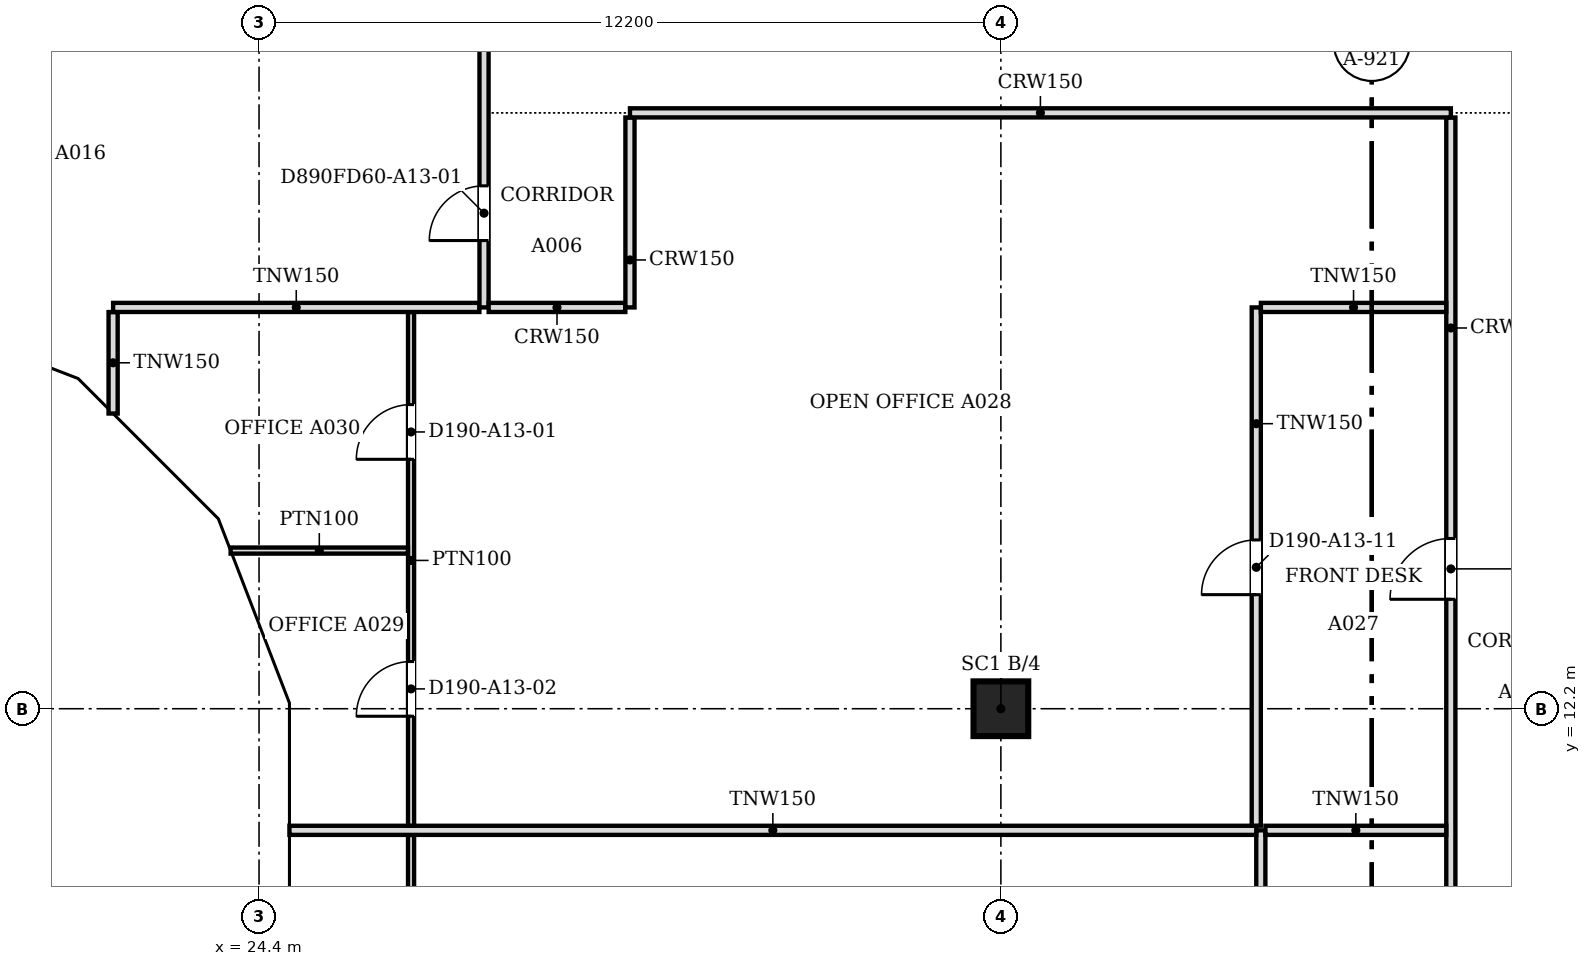
"""IFC4 building model, lengths in metres.
Left out: names, types, materials, properties, quantities, classifications, styles, units other than length and angle.
Written with IfcOpenShell. Run it as: python <this file> out.ifc"""

import sys

from ifc_helpers import new_model, si_unit, direction, frame, frame_2d, origin, origin_2d, place, context, subcontext, project, spatial, polyline, rectangle, outline, extrude, faceted_brep, source, transform, mapped, element, fill, save


model = new_model("IFC4")
c1 = context("Model", 3, precision=1e-05, world=origin(), true_north=direction((0.0, 1.0)))
c2 = subcontext(c1, "Body", "Model", "MODEL_VIEW")
j1 = project(units=[si_unit("LENGTHUNIT", "METRE"), si_unit("PLANEANGLEUNIT", "RADIAN")], contexts=[c1])
p1 = place(None, origin())
s1 = spatial("IfcSite", under=j1, at=p1, CompositionType="ELEMENT")
p2 = place(p1, origin())
s2 = spatial("IfcBuilding", under=s1, at=p2, CompositionType="ELEMENT")
p3 = place(p2, frame((0.0, 0.0, 143.0)))
s3 = spatial("IfcBuildingStorey", under=s2, at=p3, CompositionType="ELEMENT", Elevation=143.0)
p4 = place(p3, frame((36.6, 12.2, 0.0), z_axis=(0.0, 0.0, 1.0), x_axis=(1.0, 0.0, 0.0)))
e1 = element("IfcColumn", 1, at=p4, inside=s3, PredefinedType="COLUMN", context=c2, shape_type="SweptSolid", body=[
    extrude(rectangle(XDim=0.9, YDim=0.9, at=origin_2d()), origin(), (0.0, 0.0, 1.0), 3.6),
])
m1 = source(origin(), c2, "Body", "Brep", [
    faceted_brep([(0.093, -0.25, 0.056), (3.143, -0.25, 3.736), (3.143, -0.25, 3.864), (0.093, -0.25, 7.544), (0.0, 0.25, 7.543), (0.047, 0.25, 7.6), (3.196, 0.25, 3.8), (0.047, 0.25, 0.0), (0.0, 0.25, 0.057), (3.196, -0.0, 3.8), (0.047, 0.0, 0.0), (0.047, 0.0, 7.6)], [[[0, 1, 2, 3]], [[4, 5, 6, 7, 8]], [[7, 6, 9, 1, 0, 10]], [[6, 5, 11, 3, 2, 9]], [[5, 4, 11]], [[8, 7, 10]], [[8, 10, 0, 3, 11, 4]], [[1, 9, 2]]]),
])
p5 = place(p3, frame((18.303, 18.567, -3.8), z_axis=(0.0, 0.0, 1.0), x_axis=(0.932978940178, -0.359930961693, 0.0)))
e2 = element("IfcWall", 2, at=p5, inside=s3, PredefinedType="SOLIDWALL", context=c2, shape_type="MappedRepresentation", body=[
    mapped(m1, transform((0.0, 0.0, 0.0), scale=1.0)),
])
m2 = source(origin(), c2, "Body", "SweptSolid", [
    extrude(outline(polyline([(0.247, 0.633), (2.871, 3.8), (0.247, 6.967), (0.247, 0.633)])), frame((0.0, 0.26, 0.0), z_axis=(0.0, -1.0, 0.0), x_axis=(1.0, 0.0, 0.0)), (0.0, 0.0, 1.0), 0.52),
])
p6 = place(p5, origin())
e3 = element("IfcOpeningElement", 3, at=p6, cuts=e2, PredefinedType="OPENING", context=c2, shape_type="MappedRepresentation", body=[
    mapped(m2, transform((0.0, 0.0, 0.0), scale=1.0)),
])
m3 = source(origin(), c2, "Body", "Brep", [
    faceted_brep([(3.103, -0.25, 7.536), (0.053, -0.25, 3.864), (0.053, -0.25, 3.736), (3.103, -0.25, 0.064), (0.0, 0.25, 3.8), (3.156, 0.25, 7.6), (3.209, 0.25, 7.536), (3.209, 0.25, 0.064), (3.156, 0.25, 0.0), (3.156, -0.0, 0.0), (3.156, -0.0, 7.6), (0.0, 0.0, 3.8)], [[[0, 1, 2, 3]], [[4, 5, 6, 7, 8]], [[8, 7, 9]], [[6, 5, 10]], [[5, 4, 11, 1, 0, 10]], [[4, 8, 9, 3, 2, 11]], [[11, 2, 1]], [[3, 9, 7, 6, 10, 0]]]),
])
p7 = place(p3, frame((21.285, 17.417, -3.8), z_axis=(0.0, 0.0, 1.0), x_axis=(0.707106781187, -0.707106781187, 0.0)))
e4 = element("IfcWall", 4, at=p7, inside=s3, PredefinedType="SOLIDWALL", context=c2, shape_type="MappedRepresentation", body=[
    mapped(m3, transform((0.0, 0.0, 0.0), scale=1.0)),
])
m4 = source(origin(), c2, "Body", "SweptSolid", [
    extrude(outline(polyline([(2.956, 6.968), (0.325, 3.8), (2.956, 0.632), (2.956, 6.968)])), frame((0.0, 0.26, 0.0), z_axis=(0.0, -1.0, 0.0), x_axis=(1.0, 0.0, 0.0)), (0.0, 0.0, 1.0), 0.52),
])
p8 = place(p7, origin())
e5 = element("IfcOpeningElement", 5, at=p8, cuts=e4, PredefinedType="OPENING", context=c2, shape_type="MappedRepresentation", body=[
    mapped(m4, transform((0.0, 0.0, 0.0), scale=1.0)),
])
m5 = source(origin(), c2, "Body", "Brep", [
    faceted_brep([(0.106, -0.25, 0.064), (3.156, -0.25, 3.744), (3.156, -0.25, 3.856), (0.106, -0.25, 7.536), (0.0, 0.25, 7.536), (0.053, 0.25, 7.6), (3.202, 0.25, 3.8), (0.053, 0.25, 0.0), (0.0, 0.25, 0.064), (3.202, -0.0, 3.8), (0.053, 0.0, 0.0), (0.053, 0.0, 7.6)], [[[0, 1, 2, 3]], [[4, 5, 6, 7, 8]], [[7, 6, 9, 1, 0, 10]], [[6, 5, 11, 3, 2, 9]], [[5, 4, 11]], [[8, 7, 10]], [[8, 10, 0, 3, 11, 4]], [[1, 9, 2]]]),
])
p9 = place(p3, frame((23.497, 15.234, -3.8), z_axis=(0.0, 0.0, 1.0), x_axis=(0.359913782069, -0.932985567668, 0.0)))
e6 = element("IfcWall", 6, at=p9, inside=s3, PredefinedType="SOLIDWALL", context=c2, shape_type="MappedRepresentation", body=[
    mapped(m5, transform((0.0, 0.0, 0.0), scale=1.0)),
])
m6 = source(origin(), c2, "Body", "SweptSolid", [
    extrude(outline(polyline([(0.253, 0.633), (2.878, 3.8), (0.253, 6.967), (0.253, 0.633)])), frame((0.0, 0.26, 0.0), z_axis=(0.0, -1.0, 0.0), x_axis=(1.0, 0.0, 0.0)), (0.0, 0.0, 1.0), 0.52),
])
p10 = place(p9, origin())
e7 = element("IfcOpeningElement", 7, at=p10, cuts=e6, PredefinedType="OPENING", context=c2, shape_type="MappedRepresentation", body=[
    mapped(m6, transform((0.0, 0.0, 0.0), scale=1.0)),
])
m7 = source(origin(), c2, "Body", "Brep", [
    faceted_brep([(3.096, -0.25, 0.0), (6.1, -0.25, 3.8), (3.096, -0.25, 7.6), (0.047, -0.25, 3.857), (0.047, -0.25, 3.743), (0.0, 0.25, 3.8), (3.096, 0.25, 7.6), (6.053, 0.25, 3.859), (6.053, 0.25, 3.741), (3.096, 0.25, 0.0), (6.1, -0.0, 3.8), (0.0, 0.0, 3.8)], [[[0, 1, 2, 3, 4]], [[5, 6, 7, 8, 9]], [[9, 8, 10, 1, 0]], [[7, 6, 2, 1, 10]], [[6, 5, 11, 3, 2]], [[5, 9, 0, 4, 11]], [[11, 4, 3]], [[10, 8, 7]]]),
])
p11 = place(p3, frame((24.65, 12.247, -3.8), z_axis=(0.0, 0.0, 1.0), x_axis=(0.0, -1.0, 0.0)))
e8 = element("IfcWall", 8, at=p11, inside=s3, PredefinedType="SOLIDWALL", context=c2, shape_type="MappedRepresentation", body=[
    mapped(m7, transform((0.0, 0.0, 0.0), scale=1.0)),
])
m8 = source(origin(), c2, "Body", "SweptSolid", [
    extrude(outline(polyline([(3.094, 0.399), (5.781, 3.8), (3.094, 7.201), (0.323, 3.8), (3.094, 0.399)])), frame((0.0, 0.26, 0.0), z_axis=(0.0, -1.0, 0.0), x_axis=(1.0, 0.0, 0.0)), (0.0, 0.0, 1.0), 0.52),
])
p12 = place(p11, origin())
e9 = element("IfcOpeningElement", 9, at=p12, cuts=e8, PredefinedType="OPENING", context=c2, shape_type="MappedRepresentation", body=[
    mapped(m8, transform((0.0, 0.0, 0.0), scale=1.0)),
])
p13 = place(p2, frame((0.0, 0.0, 146.8)))
s4 = spatial("IfcBuildingStorey", under=s2, at=p13, CompositionType="ELEMENT", Elevation=146.8)
m9 = source(origin(), c2, "Body", "Brep", [
    faceted_brep([(3.096, -0.25, 7.536), (0.047, -0.25, 3.856), (0.047, -0.25, 3.744), (3.096, -0.25, 0.064), (0.0, 0.25, 3.8), (3.149, 0.25, 7.6), (3.202, 0.25, 7.536), (3.202, 0.25, 0.064), (3.149, 0.25, 0.0), (3.149, -0.0, 0.0), (3.149, -0.0, 7.6), (0.0, 0.0, 3.8)], [[[0, 1, 2, 3]], [[4, 5, 6, 7, 8]], [[8, 7, 9]], [[6, 5, 10]], [[5, 4, 11, 1, 0, 10]], [[4, 8, 9, 3, 2, 11]], [[11, 2, 1]], [[3, 9, 7, 6, 10, 0]]]),
])
p14 = place(p13, frame((18.346, 18.55, -3.8), z_axis=(0.0, 0.0, 1.0), x_axis=(0.932985567668, -0.359913782069, 0.0)))
e10 = element("IfcWall", 10, at=p14, inside=s4, PredefinedType="SOLIDWALL", context=c2, shape_type="MappedRepresentation", body=[
    mapped(m9, transform((0.0, 0.0, 0.0), scale=1.0)),
])
m10 = source(origin(), c2, "Body", "SweptSolid", [
    extrude(outline(polyline([(2.949, 6.967), (0.325, 3.8), (2.949, 0.633), (2.949, 6.967)])), frame((0.0, 0.26, 0.0), z_axis=(0.0, -1.0, 0.0), x_axis=(1.0, 0.0, 0.0)), (0.0, 0.0, 1.0), 0.52),
])
p15 = place(p14, origin())
e11 = element("IfcOpeningElement", 11, at=p15, cuts=e10, PredefinedType="OPENING", context=c2, shape_type="MappedRepresentation", body=[
    mapped(m10, transform((0.0, 0.0, 0.0), scale=1.0)),
])
m11 = source(origin(), c2, "Body", "Brep", [
    faceted_brep([(0.106, -0.25, 0.064), (3.156, -0.25, 3.736), (3.156, -0.25, 3.864), (0.106, -0.25, 7.536), (0.0, 0.25, 7.536), (0.053, 0.25, 7.6), (3.209, 0.25, 3.8), (0.053, 0.25, 0.0), (0.0, 0.25, 0.064), (3.209, -0.0, 3.8), (0.053, 0.0, 0.0), (0.053, 0.0, 7.6)], [[[0, 1, 2, 3]], [[4, 5, 6, 7, 8]], [[7, 6, 9, 1, 0, 10]], [[6, 5, 11, 3, 2, 9]], [[5, 4, 11]], [[8, 7, 10]], [[8, 10, 0, 3, 11, 4]], [[1, 9, 2]]]),
])
p16 = place(p13, frame((21.248, 17.454, -3.8), z_axis=(0.0, 0.0, 1.0), x_axis=(0.707106781187, -0.707106781187, 0.0)))
e12 = element("IfcWall", 12, at=p16, inside=s4, PredefinedType="SOLIDWALL", context=c2, shape_type="MappedRepresentation", body=[
    mapped(m11, transform((0.0, 0.0, 0.0), scale=1.0)),
])
m12 = source(origin(), c2, "Body", "SweptSolid", [
    extrude(outline(polyline([(0.253, 0.632), (2.884, 3.8), (0.253, 6.968), (0.253, 0.632)])), frame((0.0, 0.26, 0.0), z_axis=(0.0, -1.0, 0.0), x_axis=(1.0, 0.0, 0.0)), (0.0, 0.0, 1.0), 0.52),
])
p17 = place(p16, origin())
e13 = element("IfcOpeningElement", 13, at=p17, cuts=e12, PredefinedType="OPENING", context=c2, shape_type="MappedRepresentation", body=[
    mapped(m12, transform((0.0, 0.0, 0.0), scale=1.0)),
])
m13 = source(origin(), c2, "Body", "Brep", [
    faceted_brep([(3.103, -0.25, 7.544), (0.053, -0.25, 3.864), (0.053, -0.25, 3.736), (3.103, -0.25, 0.056), (0.0, 0.25, 3.8), (3.149, 0.25, 7.6), (3.196, 0.25, 7.543), (3.196, 0.25, 0.057), (3.149, 0.25, 0.0), (3.149, -0.0, 0.0), (3.149, -0.0, 7.6), (0.0, 0.0, 3.8)], [[[0, 1, 2, 3]], [[4, 5, 6, 7, 8]], [[8, 7, 9]], [[6, 5, 10]], [[5, 4, 11, 1, 0, 10]], [[4, 8, 9, 3, 2, 11]], [[11, 2, 1]], [[3, 9, 7, 6, 10, 0]]]),
])
p18 = place(p13, frame((23.517, 15.185, -3.8), z_axis=(0.0, 0.0, 1.0), x_axis=(0.359864468756, -0.933004589553, 0.0)))
e14 = element("IfcWall", 14, at=p18, inside=s4, PredefinedType="SOLIDWALL", context=c2, shape_type="MappedRepresentation", body=[
    mapped(m13, transform((0.0, 0.0, 0.0), scale=1.0)),
])
p19 = place(p18, origin())
e15 = element("IfcOpeningElement", 15, at=p19, cuts=e14, PredefinedType="OPENING", context=c2, shape_type="MappedRepresentation", body=[
    mapped(m10, transform((0.0, 0.0, 0.0), scale=1.0)),
])
m14 = source(origin(), c2, "Body", "Brep", [
    faceted_brep([(0.093, -0.25, 0.057), (3.143, -0.25, 3.8), (0.093, -0.25, 7.543), (0.0, 0.25, 7.544), (0.047, 0.25, 7.6), (3.143, 0.25, 3.8), (0.047, 0.25, 0.0), (0.0, 0.25, 0.056), (0.047, 0.0, 0.0), (0.047, 0.0, 7.6)], [[[0, 1, 2]], [[3, 4, 5, 6, 7]], [[6, 5, 1, 0, 8]], [[5, 4, 9, 2, 1]], [[4, 3, 9]], [[7, 6, 8]], [[7, 8, 0, 2, 9, 3]]]),
])
p20 = place(p13, frame((24.65, 12.293, -3.8), z_axis=(0.0, 0.0, 1.0), x_axis=(0.0, -1.0, 0.0)))
e16 = element("IfcWall", 16, at=p20, inside=s4, PredefinedType="SOLIDWALL", context=c2, shape_type="MappedRepresentation", body=[
    mapped(m14, transform((0.0, 0.0, 0.0), scale=1.0)),
])
m15 = source(origin(), c2, "Body", "SweptSolid", [
    extrude(outline(polyline([(0.247, 0.641), (2.821, 3.8), (0.247, 6.959), (0.247, 0.641)])), frame((0.0, 0.26, 0.0), z_axis=(0.0, -1.0, 0.0), x_axis=(1.0, 0.0, 0.0)), (0.0, 0.0, 1.0), 0.52),
])
p21 = place(p20, origin())
e17 = element("IfcOpeningElement", 17, at=p21, cuts=e16, PredefinedType="OPENING", context=c2, shape_type="MappedRepresentation", body=[
    mapped(m15, transform((0.0, 0.0, 0.0), scale=1.0)),
])
p22 = place(p3, frame((44.0, 0.5, 0.0), z_axis=(0.0, 0.0, 1.0), x_axis=(0.0, 1.0, 0.0)))
e18 = element("IfcWall", 18, at=p22, inside=s3, PredefinedType="PARTITIONING", context=c2, shape_type="SweptSolid", body=[
    extrude(rectangle(XDim=21.424, YDim=0.15, at=frame_2d((10.712, 0.0))), origin(), (0.0, 0.0, 1.0), 3.067),
])
m16 = source(origin(), c2, "Body", "SweptSolid", [
    extrude(rectangle(XDim=1.0, YDim=2.1, at=frame_2d((0.5, 1.05))), frame((0.0, 0.085, 0.0), z_axis=(0.0, -1.0, 0.0), x_axis=(1.0, 0.0, 0.0)), (0.0, 0.0, 1.0), 0.17),
])
p23 = place(p22, frame((6.2, 0.0, 0.0)))
e19 = element("IfcOpeningElement", 19, at=p23, cuts=e18, PredefinedType="OPENING", context=c2, shape_type="MappedRepresentation", body=[
    mapped(m16, transform((0.0, 0.0, 0.0), scale=1.0)),
])
p24 = place(p22, frame((13.5, 0.0, 0.0)))
e20 = element("IfcOpeningElement", 20, at=p24, cuts=e18, PredefinedType="OPENING", context=c2, shape_type="MappedRepresentation", body=[
    mapped(m16, transform((0.0, 0.0, 0.0), scale=1.0)),
])
p25 = place(p3, frame((26.9, 4.2, 0.0), z_axis=(0.0, 0.0, 1.0), x_axis=(0.0, 1.0, 0.0)))
e21 = element("IfcWall", 21, at=p25, inside=s3, PredefinedType="PARTITIONING", context=c2, shape_type="SweptSolid", body=[
    extrude(rectangle(XDim=5.924, YDim=0.1, at=frame_2d((2.962, 0.0))), origin(), (0.0, 0.0, 1.0), 3.067),
])
m17 = source(origin(), c2, "Body", "SweptSolid", [
    extrude(rectangle(XDim=0.9, YDim=2.1, at=frame_2d((0.45, 1.05))), frame((0.0, 0.06, 0.0), z_axis=(0.0, -1.0, 0.0), x_axis=(1.0, 0.0, 0.0)), (0.0, 0.0, 1.0), 0.12),
])
p26 = place(p25, frame((2.5, 0.0, 0.0)))
e22 = element("IfcOpeningElement", 22, at=p26, cuts=e21, PredefinedType="OPENING", context=c2, shape_type="MappedRepresentation", body=[
    mapped(m17, transform((0.0, 0.0, 0.0), scale=1.0)),
])
p27 = place(p3, frame((40.875, 4.2, 0.0), z_axis=(0.0, 0.0, 1.0), x_axis=(0.0, 1.0, 0.0)))
e23 = element("IfcWall", 23, at=p27, inside=s3, PredefinedType="PARTITIONING", context=c2, shape_type="SweptSolid", body=[
    extrude(rectangle(XDim=6.0, YDim=0.15, at=frame_2d((3.0, 0.0))), origin(), (0.0, 0.0, 1.0), 3.067),
])
p28 = place(p3, frame((24.9, 10.2, 0.0), z_axis=(0.0, 0.0, 1.0), x_axis=(1.0, 0.0, 0.0)))
e24 = element("IfcWall", 24, at=p28, inside=s3, PredefinedType="PARTITIONING", context=c2, shape_type="SweptSolid", body=[
    extrude(rectangle(XDim=15.9, YDim=0.15, at=frame_2d((7.95, 0.0))), origin(), (0.0, 0.0, 1.0), 3.067),
])
p29 = place(p3, frame((40.951, 10.2, 0.0), z_axis=(0.0, 0.0, 1.0), x_axis=(1.0, 0.0, 0.0)))
e25 = element("IfcWall", 25, at=p29, inside=s3, PredefinedType="PARTITIONING", context=c2, shape_type="SweptSolid", body=[
    extrude(rectangle(XDim=2.973, YDim=0.15, at=frame_2d((1.487, 0.0))), origin(), (0.0, 0.0, 1.0), 3.067),
])
p30 = place(p3, frame((26.9, 10.276, 0.0), z_axis=(0.0, 0.0, 1.0), x_axis=(0.0, 1.0, 0.0)))
e26 = element("IfcWall", 26, at=p30, inside=s3, PredefinedType="PARTITIONING", context=c2, shape_type="SweptSolid", body=[
    extrude(rectangle(XDim=8.448, YDim=0.1, at=frame_2d((4.224, 0.0))), origin(), (0.0, 0.0, 1.0), 3.067),
])
p31 = place(p30, frame((6.026, 0.0, 0.0)))
e27 = element("IfcOpeningElement", 27, at=p31, cuts=e26, PredefinedType="OPENING", context=c2, shape_type="MappedRepresentation", body=[
    mapped(m17, transform((0.0, 0.0, 0.0), scale=1.0)),
])
p32 = place(p30, frame((1.8, 0.0, 0.0)))
e28 = element("IfcOpeningElement", 28, at=p32, cuts=e26, PredefinedType="OPENING", context=c2, shape_type="MappedRepresentation", body=[
    mapped(m17, transform((0.0, 0.0, 0.0), scale=1.0)),
])
p33 = place(p3, frame((40.8, 10.276, 0.0), z_axis=(0.0, 0.0, 1.0), x_axis=(0.0, 1.0, 0.0)))
e29 = element("IfcWall", 29, at=p33, inside=s3, PredefinedType="PARTITIONING", context=c2, shape_type="SweptSolid", body=[
    extrude(rectangle(XDim=8.524, YDim=0.15, at=frame_2d((4.262, 0.0))), origin(), (0.0, 0.0, 1.0), 3.067),
])
m18 = source(origin(), c2, "Body", "SweptSolid", [
    extrude(rectangle(XDim=0.9, YDim=2.1, at=frame_2d((0.45, 1.05))), frame((0.0, 0.085, 0.0), z_axis=(0.0, -1.0, 0.0), x_axis=(1.0, 0.0, 0.0)), (0.0, 0.0, 1.0), 0.17),
])
p34 = place(p33, frame((3.8, 0.0, 0.0)))
e30 = element("IfcOpeningElement", 30, at=p34, cuts=e29, PredefinedType="OPENING", context=c2, shape_type="MappedRepresentation", body=[
    mapped(m18, transform((0.0, 0.0, 0.0), scale=1.0)),
])
p35 = place(p3, frame((23.933, 14.801, 0.0), z_axis=(0.0, 0.0, 1.0), x_axis=(1.0, 0.0, 0.0)))
e31 = element("IfcWall", 31, at=p35, inside=s3, PredefinedType="PARTITIONING", context=c2, shape_type="SweptSolid", body=[
    extrude(rectangle(XDim=2.917, YDim=0.1, at=frame_2d((1.458, 0.0))), origin(), (0.0, 0.0, 1.0), 3.067),
])
p36 = place(p3, frame((22.0, 17.055, 0.0), z_axis=(0.0, 0.0, 1.0), x_axis=(0.0, 1.0, 0.0)))
e32 = element("IfcWall", 32, at=p36, inside=s3, PredefinedType="PARTITIONING", context=c2, shape_type="SweptSolid", body=[
    extrude(rectangle(XDim=1.669, YDim=0.15, at=frame_2d((0.834, 0.0))), origin(), (0.0, 0.0, 1.0), 3.067),
])
p37 = place(p3, frame((22.0, 18.8, 0.0), z_axis=(0.0, 0.0, 1.0), x_axis=(1.0, 0.0, 0.0)))
e33 = element("IfcWall", 33, at=p37, inside=s3, PredefinedType="PARTITIONING", context=c2, shape_type="SweptSolid", body=[
    extrude(rectangle(XDim=6.024, YDim=0.15, at=frame_2d((3.012, 0.0))), origin(), (0.0, 0.0, 1.0), 3.067),
])
p38 = place(p3, frame((28.1, 18.8, 0.0), z_axis=(0.0, 0.0, 1.0), x_axis=(0.0, 1.0, 0.0)))
e34 = element("IfcWall", 34, at=p38, inside=s3, PredefinedType="PARTITIONING", context=c2, shape_type="SweptSolid", body=[
    extrude(rectangle(XDim=26.024, YDim=0.15, at=frame_2d((13.012, 0.0))), origin(), (0.0, 0.0, 1.0), 3.067),
])
p39 = place(p38, frame((1.1, 0.0, 0.0)))
e35 = element("IfcOpeningElement", 35, at=p39, cuts=e34, PredefinedType="OPENING", context=c2, shape_type="MappedRepresentation", body=[
    mapped(m18, transform((0.0, 0.0, 0.0), scale=1.0)),
])
p40 = place(p38, frame((14.201, 0.0, 0.0)))
e36 = element("IfcOpeningElement", 36, at=p40, cuts=e34, PredefinedType="OPENING", context=c2, shape_type="MappedRepresentation", body=[
    mapped(m16, transform((0.0, 0.0, 0.0), scale=1.0)),
])
p41 = place(p38, frame((8.2, 0.0, 0.0)))
e37 = element("IfcOpeningElement", 37, at=p41, cuts=e34, PredefinedType="OPENING", context=c2, shape_type="MappedRepresentation", body=[
    mapped(m18, transform((0.0, 0.0, 0.0), scale=1.0)),
])
p42 = place(p38, frame((21.4, 0.0, 0.0)))
e38 = element("IfcOpeningElement", 38, at=p42, cuts=e34, PredefinedType="OPENING", context=c2, shape_type="MappedRepresentation", body=[
    mapped(m16, transform((0.0, 0.0, 0.0), scale=1.0)),
])
p43 = place(p3, frame((28.176, 18.8, 0.0), z_axis=(0.0, 0.0, 1.0), x_axis=(1.0, 0.0, 0.0)))
e39 = element("IfcWall", 39, at=p43, inside=s3, PredefinedType="PARTITIONING", context=c2, shape_type="SweptSolid", body=[
    extrude(rectangle(XDim=2.248, YDim=0.15, at=frame_2d((1.124, 0.0))), origin(), (0.0, 0.0, 1.0), 3.067),
])
p44 = place(p3, frame((30.5, 18.8, 0.0), z_axis=(0.0, 0.0, 1.0), x_axis=(0.0, 1.0, 0.0)))
e40 = element("IfcWall", 40, at=p44, inside=s3, PredefinedType="PARTITIONING", context=c2, shape_type="SweptSolid", body=[
    extrude(rectangle(XDim=3.124, YDim=0.15, at=frame_2d((1.562, 0.0))), origin(), (0.0, 0.0, 1.0), 3.067),
])
p45 = place(p3, frame((40.876, 18.8, 0.0), z_axis=(0.0, 0.0, 1.0), x_axis=(1.0, 0.0, 0.0)))
e41 = element("IfcWall", 41, at=p45, inside=s3, PredefinedType="PARTITIONING", context=c2, shape_type="SweptSolid", body=[
    extrude(rectangle(XDim=3.048, YDim=0.15, at=frame_2d((1.524, 0.0))), origin(), (0.0, 0.0, 1.0), 3.067),
])
p46 = place(p3, frame((30.5, 22.0, 0.0), z_axis=(0.0, 0.0, 1.0), x_axis=(1.0, 0.0, 0.0)))
e42 = element("IfcWall", 42, at=p46, inside=s3, PredefinedType="PARTITIONING", context=c2, shape_type="SweptSolid", body=[
    extrude(rectangle(XDim=13.5, YDim=0.15, at=frame_2d((6.75, 0.0))), origin(), (0.0, 0.0, 1.0), 3.067),
])
m19 = source(origin(), c2, "Body", "SweptSolid", [
    extrude(rectangle(XDim=0.9, YDim=2.1, at=frame_2d((0.45, 1.05))), frame((0.0, 0.025, 0.0), z_axis=(0.0, -1.0, 0.0), x_axis=(1.0, 0.0, 0.0)), (0.0, 0.0, 1.0), 0.05),
])
p47 = place(p39, origin())
e43 = element("IfcDoor", 43, at=p47, inside=s3, OperationType="SINGLE_SWING_LEFT", PredefinedType="DOOR", context=c2, shape_type="MappedRepresentation", body=[
    mapped(m19, transform((0.0, 0.0, 0.0), scale=1.0)),
])
fill(e35, e43)
p48 = place(p31, origin())
e44 = element("IfcDoor", 44, at=p48, inside=s3, OperationType="SINGLE_SWING_LEFT", PredefinedType="DOOR", context=c2, shape_type="MappedRepresentation", body=[
    mapped(m19, transform((0.0, 0.0, 0.0), scale=1.0)),
])
fill(e27, e44)
p49 = place(p32, origin())
e45 = element("IfcDoor", 45, at=p49, inside=s3, OperationType="SINGLE_SWING_LEFT", PredefinedType="DOOR", context=c2, shape_type="MappedRepresentation", body=[
    mapped(m19, transform((0.0, 0.0, 0.0), scale=1.0)),
])
fill(e28, e45)
m20 = source(origin(), c2, "Body", "SweptSolid", [
    extrude(rectangle(XDim=1.0, YDim=2.1, at=frame_2d((0.5, 1.05))), frame((0.0, 0.025, 0.0), z_axis=(0.0, -1.0, 0.0), x_axis=(1.0, 0.0, 0.0)), (0.0, 0.0, 1.0), 0.05),
])
p50 = place(p24, origin())
e46 = element("IfcDoor", 46, at=p50, inside=s3, OperationType="SINGLE_SWING_LEFT", PredefinedType="DOOR", context=c2, shape_type="MappedRepresentation", body=[
    mapped(m20, transform((0.0, 0.0, 0.0), scale=1.0)),
])
fill(e20, e46)
p51 = place(p34, origin())
e47 = element("IfcDoor", 47, at=p51, inside=s3, OperationType="SINGLE_SWING_LEFT", PredefinedType="DOOR", context=c2, shape_type="MappedRepresentation", body=[
    mapped(m19, transform((0.0, 0.0, 0.0), scale=1.0)),
])
fill(e30, e47)
save(model, sys.argv[1])
